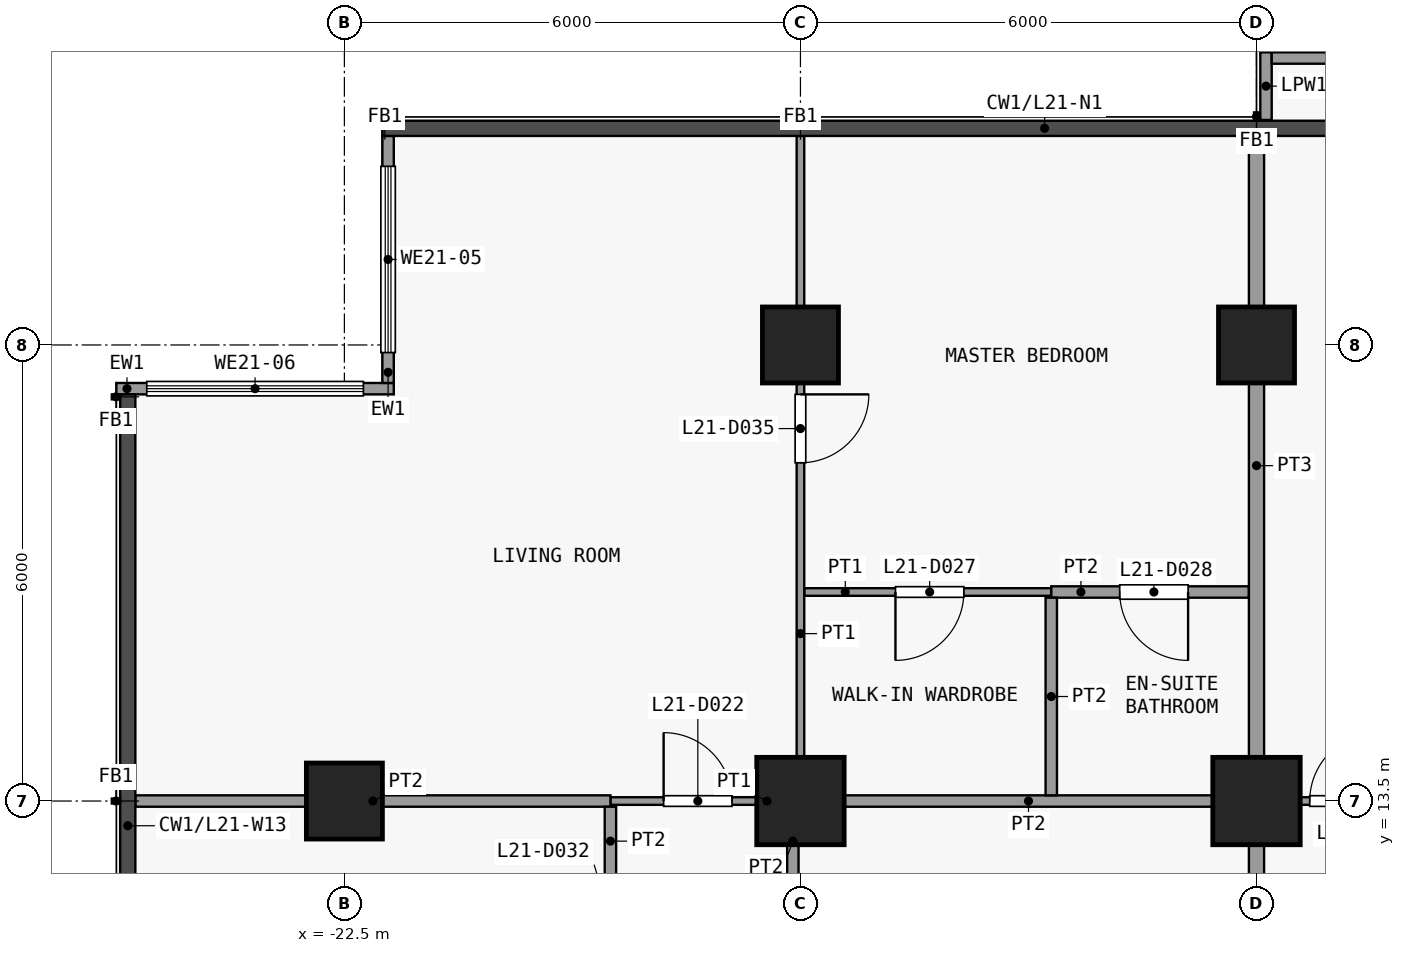
"""IFC4 building model, lengths in metres.
Left out: names, types, materials, properties, quantities, classifications, styles, units other than length and angle.
Written with IfcOpenShell. Run it as: python <this file> out.ifc"""

import sys

from ifc_helpers import new_model, si_unit, direction, frame, frame_2d, origin, origin_2d, place, context, subcontext, project, spatial, rectangle, extrude, element, fill, save


model = new_model("IFC4")
c1 = context("Model", 3, precision=1e-05, world=origin(), true_north=direction((0.0, 1.0)))
c2 = subcontext(c1, "Body", "Model", "MODEL_VIEW")
j1 = project(units=[si_unit("LENGTHUNIT", "METRE"), si_unit("PLANEANGLEUNIT", "RADIAN")], contexts=[c1])
p1 = place(None, origin())
s1 = spatial("IfcSite", under=j1, at=p1, CompositionType="ELEMENT")
p2 = place(p1, origin())
s2 = spatial("IfcBuilding", under=s1, at=p2, CompositionType="ELEMENT")
p3 = place(p2, frame((0.0, 0.0, 88.3)))
s3 = spatial("IfcBuildingStorey", under=s2, at=p3, CompositionType="ELEMENT", Elevation=88.3)
p4 = place(p3, frame((-22.5, 13.5, 0.0), z_axis=(0.0, 0.0, 1.0), x_axis=(1.0, 0.0, 0.0)))
e1 = element("IfcColumn", 1, at=p4, inside=s3, PredefinedType="COLUMN", context=c2, shape_type="SweptSolid", body=[
    extrude(rectangle(XDim=1.0, YDim=1.0, at=origin_2d()), origin(), (0.0, 0.0, 1.0), 3.6),
])
p5 = place(p3, frame((-16.5, 13.5, 0.0), z_axis=(0.0, 0.0, 1.0), x_axis=(1.0, 0.0, 0.0)))
e2 = element("IfcColumn", 2, at=p5, inside=s3, PredefinedType="COLUMN", context=c2, shape_type="SweptSolid", body=[
    extrude(rectangle(XDim=1.15, YDim=1.15, at=origin_2d()), origin(), (0.0, 0.0, 1.0), 3.6),
])
p6 = place(p3, frame((-16.5, 19.5, 0.0), z_axis=(0.0, 0.0, 1.0), x_axis=(1.0, 0.0, 0.0)))
e3 = element("IfcColumn", 3, at=p6, inside=s3, PredefinedType="COLUMN", context=c2, shape_type="SweptSolid", body=[
    extrude(rectangle(XDim=1.0, YDim=1.0, at=origin_2d()), origin(), (0.0, 0.0, 1.0), 3.6),
])
p7 = place(p3, frame((-10.5, 13.5, 0.0), z_axis=(0.0, 0.0, 1.0), x_axis=(1.0, 0.0, 0.0)))
e4 = element("IfcColumn", 4, at=p7, inside=s3, PredefinedType="COLUMN", context=c2, shape_type="SweptSolid", body=[
    extrude(rectangle(XDim=1.15, YDim=1.15, at=origin_2d()), origin(), (0.0, 0.0, 1.0), 3.6),
])
p8 = place(p3, frame((-10.5, 19.5, 0.0), z_axis=(0.0, 0.0, 1.0), x_axis=(1.0, 0.0, 0.0)))
e5 = element("IfcColumn", 5, at=p8, inside=s3, PredefinedType="COLUMN", context=c2, shape_type="SweptSolid", body=[
    extrude(rectangle(XDim=1.0, YDim=1.0, at=origin_2d()), origin(), (0.0, 0.0, 1.0), 3.6),
])
p9 = place(p3, frame((-21.925, 19.0, 0.0), z_axis=(0.0, 0.0, 1.0), x_axis=(0.0, 1.0, 0.0)))
e6 = element("IfcWall", 6, at=p9, inside=s3, PredefinedType="SOLIDWALL", context=c2, shape_type="SweptSolid", body=[
    extrude(rectangle(XDim=3.25, YDim=0.15, at=frame_2d((1.625, 0.0))), origin(), (0.0, 0.0, 1.0), 3.3),
])
p10 = place(p9, frame((0.4, 0.0, 0.9)))
e7 = element("IfcOpeningElement", 7, at=p10, cuts=e6, PredefinedType="OPENING", context=c2, shape_type="SweptSolid", body=[
    extrude(rectangle(XDim=2.45, YDim=2.4, at=frame_2d((1.225, 1.2))), frame((0.0, 0.085, 0.0), z_axis=(0.0, -1.0, 0.0), x_axis=(1.0, 0.0, 0.0)), (0.0, 0.0, 1.0), 0.17),
])
p11 = place(p3, frame((-25.5, 18.925, 0.0), z_axis=(0.0, 0.0, 1.0), x_axis=(1.0, 0.0, 0.0)))
e8 = element("IfcWall", 8, at=p11, inside=s3, PredefinedType="SOLIDWALL", context=c2, shape_type="SweptSolid", body=[
    extrude(rectangle(XDim=3.65, YDim=0.15, at=frame_2d((1.825, 0.0))), origin(), (0.0, 0.0, 1.0), 3.3),
])
p12 = place(p11, frame((0.4, 0.0, 0.9)))
e9 = element("IfcOpeningElement", 9, at=p12, cuts=e8, PredefinedType="OPENING", context=c2, shape_type="SweptSolid", body=[
    extrude(rectangle(XDim=2.85, YDim=2.4, at=frame_2d((1.425, 1.2))), frame((0.0, 0.085, 0.0), z_axis=(0.0, -1.0, 0.0), x_axis=(1.0, 0.0, 0.0)), (0.0, 0.0, 1.0), 0.17),
])
p13 = place(p3, frame((-10.375, 22.46, 0.0), z_axis=(0.0, 0.0, 1.0), x_axis=(0.0, 1.0, 0.0)))
e10 = element("IfcWall", 10, at=p13, inside=s3, PredefinedType="PARAPET", context=c2, shape_type="SweptSolid", body=[
    extrude(rectangle(XDim=0.89, YDim=0.15, at=frame_2d((0.445, 0.0))), origin(), (0.0, 0.0, 1.0), 1.15),
])
p14 = place(p3, frame((-10.3, 23.275, 0.0), z_axis=(0.0, 0.0, 1.0), x_axis=(1.0, 0.0, 0.0)))
e11 = element("IfcWall", 11, at=p14, inside=s3, PredefinedType="PARAPET", context=c2, shape_type="SweptSolid", body=[
    extrude(rectangle(XDim=5.75, YDim=0.15, at=frame_2d((2.875, 0.0))), origin(), (0.0, 0.0, 1.0), 1.15),
])
p15 = place(p3, frame((-19.0, 13.5, 0.0), z_axis=(0.0, 0.0, 1.0), x_axis=(1.0, 0.0, 0.0)))
e12 = element("IfcWall", 12, at=p15, inside=s3, PredefinedType="PARTITIONING", context=c2, shape_type="SweptSolid", body=[
    extrude(rectangle(XDim=2.4, YDim=0.1, at=frame_2d((1.2, 0.0))), origin(), (0.0, 0.0, 1.0), 3.3),
])
p16 = place(p15, frame((0.7, 0.0, 0.0)))
e13 = element("IfcOpeningElement", 13, at=p16, cuts=e12, PredefinedType="OPENING", context=c2, shape_type="SweptSolid", body=[
    extrude(rectangle(XDim=0.9, YDim=2.1, at=frame_2d((0.45, 1.05))), frame((0.0, 0.06, 0.0), z_axis=(0.0, -1.0, 0.0), x_axis=(1.0, 0.0, 0.0)), (0.0, 0.0, 1.0), 0.12),
])
p17 = place(p3, frame((-10.5, 13.5, 0.0), z_axis=(0.0, 0.0, 1.0), x_axis=(1.0, 0.0, 0.0)))
e14 = element("IfcWall", 14, at=p17, inside=s3, PredefinedType="PARTITIONING", context=c2, shape_type="SweptSolid", body=[
    extrude(rectangle(XDim=2.4, YDim=0.1, at=frame_2d((1.2, 0.0))), origin(), (0.0, 0.0, 1.0), 3.3),
])
p18 = place(p17, frame((0.7, 0.0, 0.0)))
e15 = element("IfcOpeningElement", 15, at=p18, cuts=e14, PredefinedType="OPENING", context=c2, shape_type="SweptSolid", body=[
    extrude(rectangle(XDim=0.9, YDim=2.1, at=frame_2d((0.45, 1.05))), frame((0.0, 0.06, 0.0), z_axis=(0.0, -1.0, 0.0), x_axis=(1.0, 0.0, 0.0)), (0.0, 0.0, 1.0), 0.12),
])
p19 = place(p3, frame((-25.25, 13.5, 0.0), z_axis=(0.0, 0.0, 1.0), x_axis=(1.0, 0.0, 0.0)))
e16 = element("IfcWall", 16, at=p19, inside=s3, PredefinedType="PARTITIONING", context=c2, shape_type="SweptSolid", body=[
    extrude(rectangle(XDim=6.25, YDim=0.15, at=frame_2d((3.125, 0.0))), origin(), (0.0, 0.0, 1.0), 3.3),
])
p20 = place(p3, frame((-16.5, 13.5, 0.0), z_axis=(0.0, 0.0, 1.0), x_axis=(1.0, 0.0, 0.0)))
e17 = element("IfcWall", 17, at=p20, inside=s3, PredefinedType="PARTITIONING", context=c2, shape_type="SweptSolid", body=[
    extrude(rectangle(XDim=6.0, YDim=0.15, at=frame_2d((3.0, 0.0))), origin(), (0.0, 0.0, 1.0), 3.3),
])
p21 = place(p3, frame((-16.45, 16.25, 0.0), z_axis=(0.0, 0.0, 1.0), x_axis=(1.0, 0.0, 0.0)))
e18 = element("IfcWall", 18, at=p21, inside=s3, PredefinedType="PARTITIONING", context=c2, shape_type="SweptSolid", body=[
    extrude(rectangle(XDim=3.25, YDim=0.1, at=frame_2d((1.625, 0.0))), origin(), (0.0, 0.0, 1.0), 3.3),
])
p22 = place(p21, frame((1.2, 0.0, 0.0)))
e19 = element("IfcOpeningElement", 19, at=p22, cuts=e18, PredefinedType="OPENING", context=c2, shape_type="SweptSolid", body=[
    extrude(rectangle(XDim=0.9, YDim=2.1, at=frame_2d((0.45, 1.05))), frame((0.0, 0.06, 0.0), z_axis=(0.0, -1.0, 0.0), x_axis=(1.0, 0.0, 0.0)), (0.0, 0.0, 1.0), 0.12),
])
p23 = place(p3, frame((-13.2, 16.25, 0.0), z_axis=(0.0, 0.0, 1.0), x_axis=(1.0, 0.0, 0.0)))
e20 = element("IfcWall", 20, at=p23, inside=s3, PredefinedType="PARTITIONING", context=c2, shape_type="SweptSolid", body=[
    extrude(rectangle(XDim=2.6, YDim=0.15, at=frame_2d((1.3, 0.0))), origin(), (0.0, 0.0, 1.0), 3.3),
])
p24 = place(p23, frame((0.9, 0.0, 0.0)))
e21 = element("IfcOpeningElement", 21, at=p24, cuts=e20, PredefinedType="OPENING", context=c2, shape_type="SweptSolid", body=[
    extrude(rectangle(XDim=0.9, YDim=2.1, at=frame_2d((0.45, 1.05))), frame((0.0, 0.085, 0.0), z_axis=(0.0, -1.0, 0.0), x_axis=(1.0, 0.0, 0.0)), (0.0, 0.0, 1.0), 0.17),
])
p25 = place(p3, frame((-19.0, 10.6, 0.0), z_axis=(0.0, 0.0, 1.0), x_axis=(0.0, 1.0, 0.0)))
e22 = element("IfcWall", 22, at=p25, inside=s3, PredefinedType="PARTITIONING", context=c2, shape_type="SweptSolid", body=[
    extrude(rectangle(XDim=2.825, YDim=0.15, at=frame_2d((1.413, 0.0))), origin(), (0.0, 0.0, 1.0), 3.3),
])
p26 = place(p25, frame((0.9, 0.0, 0.0)))
e23 = element("IfcOpeningElement", 23, at=p26, cuts=e22, PredefinedType="OPENING", context=c2, shape_type="SweptSolid", body=[
    extrude(rectangle(XDim=0.9, YDim=2.1, at=frame_2d((0.45, 1.05))), frame((0.0, 0.085, 0.0), z_axis=(0.0, -1.0, 0.0), x_axis=(1.0, 0.0, 0.0)), (0.0, 0.0, 1.0), 0.17),
])
p27 = place(p3, frame((-16.6, 10.6, 0.0), z_axis=(0.0, 0.0, 1.0), x_axis=(0.0, 1.0, 0.0)))
e24 = element("IfcWall", 24, at=p27, inside=s3, PredefinedType="PARTITIONING", context=c2, shape_type="SweptSolid", body=[
    extrude(rectangle(XDim=2.825, YDim=0.15, at=frame_2d((1.413, 0.0))), origin(), (0.0, 0.0, 1.0), 3.3),
])
p28 = place(p27, frame((0.9, 0.0, 0.0)))
e25 = element("IfcOpeningElement", 25, at=p28, cuts=e24, PredefinedType="OPENING", context=c2, shape_type="SweptSolid", body=[
    extrude(rectangle(XDim=0.9, YDim=2.1, at=frame_2d((0.45, 1.05))), frame((0.0, 0.085, 0.0), z_axis=(0.0, -1.0, 0.0), x_axis=(1.0, 0.0, 0.0)), (0.0, 0.0, 1.0), 0.17),
])
p29 = place(p3, frame((-16.5, 13.575, 0.0), z_axis=(0.0, 0.0, 1.0), x_axis=(0.0, 1.0, 0.0)))
e26 = element("IfcWall", 26, at=p29, inside=s3, PredefinedType="PARTITIONING", context=c2, shape_type="SweptSolid", body=[
    extrude(rectangle(XDim=8.675, YDim=0.1, at=frame_2d((4.337, 0.0))), origin(), (0.0, 0.0, 1.0), 3.3),
])
p30 = place(p29, frame((4.375, 0.0, 0.0)))
e27 = element("IfcOpeningElement", 27, at=p30, cuts=e26, PredefinedType="OPENING", context=c2, shape_type="SweptSolid", body=[
    extrude(rectangle(XDim=0.9, YDim=2.1, at=frame_2d((0.45, 1.05))), frame((0.0, 0.06, 0.0), z_axis=(0.0, -1.0, 0.0), x_axis=(1.0, 0.0, 0.0)), (0.0, 0.0, 1.0), 0.12),
])
p31 = place(p3, frame((-13.2, 13.575, 0.0), z_axis=(0.0, 0.0, 1.0), x_axis=(0.0, 1.0, 0.0)))
e28 = element("IfcWall", 28, at=p31, inside=s3, PredefinedType="PARTITIONING", context=c2, shape_type="SweptSolid", body=[
    extrude(rectangle(XDim=2.6, YDim=0.15, at=frame_2d((1.3, 0.0))), origin(), (0.0, 0.0, 1.0), 3.3),
])
p32 = place(p3, frame((-10.5, 10.6, 0.0), z_axis=(0.0, 0.0, 1.0), x_axis=(0.0, 1.0, 0.0)))
e29 = element("IfcWall", 29, at=p32, inside=s3, PredefinedType="PARTITIONING", context=c2, shape_type="SweptSolid", body=[
    extrude(rectangle(XDim=2.825, YDim=0.2, at=frame_2d((1.413, 0.0))), origin(), (0.0, 0.0, 1.0), 3.3),
])
p33 = place(p3, frame((-10.5, 13.575, 0.0), z_axis=(0.0, 0.0, 1.0), x_axis=(0.0, 1.0, 0.0)))
e30 = element("IfcWall", 30, at=p33, inside=s3, PredefinedType="PARTITIONING", context=c2, shape_type="SweptSolid", body=[
    extrude(rectangle(XDim=8.675, YDim=0.2, at=frame_2d((4.337, 0.0))), origin(), (0.0, 0.0, 1.0), 3.3),
])
p34 = place(p10, origin())
e31 = element("IfcWindow", 31, at=p34, inside=s3, PartitioningType="SINGLE_PANEL", PredefinedType="WINDOW", context=c2, shape_type="SweptSolid", body=[
    extrude(rectangle(XDim=2.45, YDim=2.4, at=frame_2d((1.225, 1.2))), frame((0.0, 0.03, 0.0), z_axis=(0.0, -1.0, 0.0), x_axis=(1.0, 0.0, 0.0)), (0.0, 0.0, 1.0), 0.06),
])
fill(e7, e31)
p35 = place(p12, origin())
e32 = element("IfcWindow", 32, at=p35, inside=s3, PartitioningType="SINGLE_PANEL", PredefinedType="WINDOW", context=c2, shape_type="SweptSolid", body=[
    extrude(rectangle(XDim=2.85, YDim=2.4, at=frame_2d((1.425, 1.2))), frame((0.0, 0.03, 0.0), z_axis=(0.0, -1.0, 0.0), x_axis=(1.0, 0.0, 0.0)), (0.0, 0.0, 1.0), 0.06),
])
fill(e9, e32)
p36 = place(p16, origin())
e33 = element("IfcDoor", 33, at=p36, inside=s3, OperationType="SINGLE_SWING_RIGHT", PredefinedType="DOOR", context=c2, shape_type="SweptSolid", body=[
    extrude(rectangle(XDim=0.9, YDim=2.1, at=frame_2d((0.45, 1.05))), frame((0.0, 0.025, 0.0), z_axis=(0.0, -1.0, 0.0), x_axis=(1.0, 0.0, 0.0)), (0.0, 0.0, 1.0), 0.05),
])
fill(e13, e33)
p37 = place(p18, origin())
e34 = element("IfcDoor", 34, at=p37, inside=s3, OperationType="SINGLE_SWING_LEFT", PredefinedType="DOOR", context=c2, shape_type="SweptSolid", body=[
    extrude(rectangle(XDim=0.9, YDim=2.1, at=frame_2d((0.45, 1.05))), frame((0.0, 0.025, 0.0), z_axis=(0.0, -1.0, 0.0), x_axis=(1.0, 0.0, 0.0)), (0.0, 0.0, 1.0), 0.05),
])
fill(e15, e34)
p38 = place(p22, origin())
e35 = element("IfcDoor", 35, at=p38, inside=s3, OperationType="SINGLE_SWING_LEFT", PredefinedType="DOOR", context=c2, shape_type="SweptSolid", body=[
    extrude(rectangle(XDim=0.9, YDim=2.1, at=frame_2d((0.45, 1.05))), frame((0.0, 0.025, 0.0), z_axis=(0.0, -1.0, 0.0), x_axis=(1.0, 0.0, 0.0)), (0.0, 0.0, 1.0), 0.05),
])
fill(e19, e35)
p39 = place(p24, origin())
e36 = element("IfcDoor", 36, at=p39, inside=s3, OperationType="SINGLE_SWING_RIGHT", PredefinedType="DOOR", context=c2, shape_type="SweptSolid", body=[
    extrude(rectangle(XDim=0.9, YDim=2.1, at=frame_2d((0.45, 1.05))), frame((0.0, 0.025, 0.0), z_axis=(0.0, -1.0, 0.0), x_axis=(1.0, 0.0, 0.0)), (0.0, 0.0, 1.0), 0.05),
])
fill(e21, e36)
p40 = place(p30, origin())
e37 = element("IfcDoor", 37, at=p40, inside=s3, OperationType="SINGLE_SWING_RIGHT", PredefinedType="DOOR", context=c2, shape_type="SweptSolid", body=[
    extrude(rectangle(XDim=0.9, YDim=2.1, at=frame_2d((0.45, 1.05))), frame((0.0, 0.025, 0.0), z_axis=(0.0, -1.0, 0.0), x_axis=(1.0, 0.0, 0.0)), (0.0, 0.0, 1.0), 0.05),
])
fill(e27, e37)
save(model, sys.argv[1])
